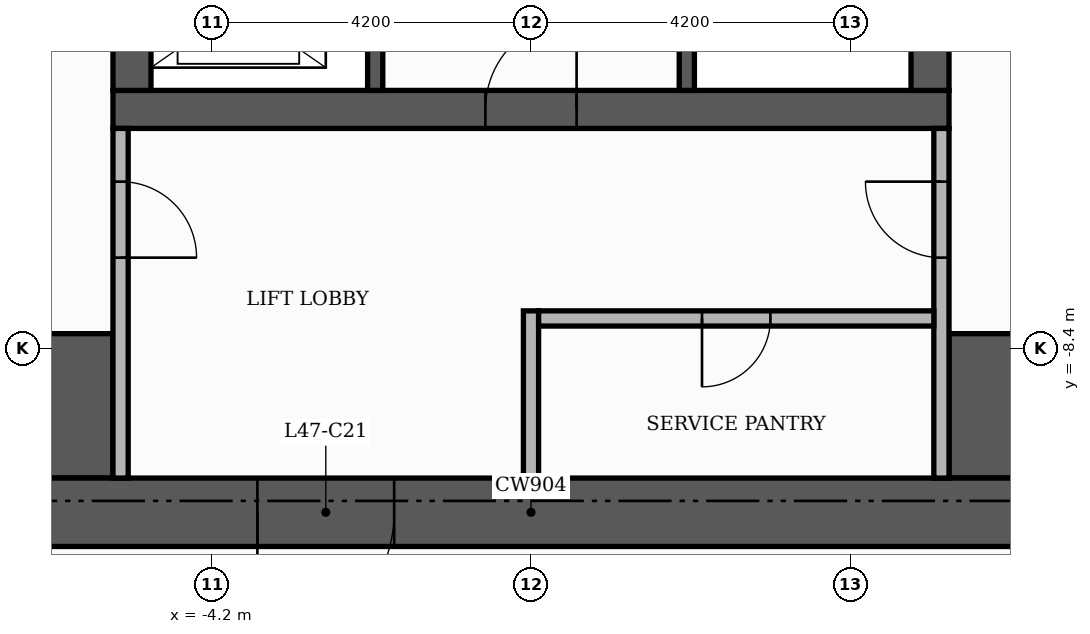
"""IFC4 building model, lengths in metres.
Left out: names, types, materials, properties, quantities, classifications, styles, units other than length and angle.
Written with IfcOpenShell. Run it as: python <this file> out.ifc"""

import sys

from ifc_helpers import new_model, si_unit, direction, frame, frame_2d, origin, place, context, subcontext, project, spatial, rectangle, extrude, element, fill, save


model = new_model("IFC4")
c1 = context("Model", 3, precision=1e-05, world=origin(), true_north=direction((0.0, 1.0)))
c2 = subcontext(c1, "Body", "Model", "MODEL_VIEW")
j1 = project(units=[si_unit("LENGTHUNIT", "METRE"), si_unit("PLANEANGLEUNIT", "RADIAN")], contexts=[c1])
p1 = place(None, origin())
s1 = spatial("IfcSite", under=j1, at=p1, CompositionType="ELEMENT")
p2 = place(p1, origin())
s2 = spatial("IfcBuilding", under=s1, at=p2, CompositionType="ELEMENT")
p3 = place(p2, frame((0.0, 0.0, 200.1)))
s3 = spatial("IfcBuildingStorey", under=s2, at=p3, CompositionType="ELEMENT", Elevation=200.1)
p4 = place(p3, frame((-5.5, -5.25, 0.0), z_axis=(0.0, 0.0, 1.0), x_axis=(1.0, 0.0, 0.0)))
e1 = element("IfcWall", 1, at=p4, inside=s3, PredefinedType="SHEAR", context=c2, shape_type="SweptSolid", body=[
    extrude(rectangle(XDim=11.0, YDim=0.5, at=frame_2d((5.5, 0.0))), origin(), (0.0, 0.0, 1.0), 3.48),
])
p5 = place(p4, frame((4.9, 0.0, 0.0)))
e2 = element("IfcOpeningElement", 2, at=p5, cuts=e1, PredefinedType="OPENING", context=c2, shape_type="SweptSolid", body=[
    extrude(rectangle(XDim=1.2, YDim=2.1, at=frame_2d((0.6, 1.05))), frame((0.0, 0.26, 0.0), z_axis=(0.0, -1.0, 0.0), x_axis=(1.0, 0.0, 0.0)), (0.0, 0.0, 1.0), 0.52),
])
for number, where, z_axis, x_axis in (
    (3, (-5.25, -5.0, 0.0), (0.0, 0.0, 1.0), (0.0, 1.0, 0.0)),
    (4, (5.25, -5.0, 0.0), (0.0, 0.0, 1.0), (0.0, 1.0, 0.0)),
):
    element("IfcWall", number, at=place(p3, frame(where, z_axis=z_axis, x_axis=x_axis)), inside=s3, PredefinedType="SHEAR", context=c2, shape_type="SweptSolid", body=[
        extrude(rectangle(XDim=10.5, YDim=0.5, at=frame_2d((5.25, 0.0))), origin(), (0.0, 0.0, 1.0), 3.48),
    ])
for number, where, z_axis, x_axis in (
    (5, (-10.1, -9.15, 0.0), (0.0, 0.0, 1.0), (1.0, 0.0, 0.0)),
    (6, (5.5, -9.15, 0.0), (0.0, 0.0, 1.0), (1.0, 0.0, 0.0)),
):
    element("IfcWall", number, at=place(p3, frame(where, z_axis=z_axis, x_axis=x_axis)), inside=s3, PredefinedType="SHEAR", context=c2, shape_type="SweptSolid", body=[
        extrude(rectangle(XDim=4.6, YDim=1.9, at=frame_2d((2.3, 0.0))), origin(), (0.0, 0.0, 1.0), 3.48),
    ])
p6 = place(p3, frame((2.05, -5.0, 0.0), z_axis=(0.0, 0.0, 1.0), x_axis=(0.0, 1.0, 0.0)))
e7 = element("IfcWall", 7, at=p6, inside=s3, PredefinedType="SHEAR", context=c2, shape_type="SweptSolid", body=[
    extrude(rectangle(XDim=6.6, YDim=0.2, at=frame_2d((3.3, 0.0))), origin(), (0.0, 0.0, 1.0), 3.48),
])
p7 = place(p6, frame((5.25, 0.0, 0.0)))
e8 = element("IfcOpeningElement", 8, at=p7, cuts=e7, PredefinedType="OPENING", context=c2, shape_type="SweptSolid", body=[
    extrude(rectangle(XDim=1.0, YDim=2.1, at=frame_2d((0.5, 1.05))), frame((0.0, 0.11, 0.0), z_axis=(0.0, -1.0, 0.0), x_axis=(1.0, 0.0, 0.0)), (0.0, 0.0, 1.0), 0.22),
])
p8 = place(p3, frame((-2.05, -5.0, 0.0), z_axis=(0.0, 0.0, 1.0), x_axis=(0.0, 1.0, 0.0)))
e9 = element("IfcWall", 9, at=p8, inside=s3, PredefinedType="SHEAR", context=c2, shape_type="SweptSolid", body=[
    extrude(rectangle(XDim=3.4, YDim=0.2, at=frame_2d((1.7, 0.0))), origin(), (0.0, 0.0, 1.0), 3.48),
])
p9 = place(p8, frame((0.55, 0.0, 0.0)))
e10 = element("IfcOpeningElement", 10, at=p9, cuts=e9, PredefinedType="OPENING", context=c2, shape_type="SweptSolid", body=[
    extrude(rectangle(XDim=1.1, YDim=2.1, at=frame_2d((0.55, 1.05))), frame((0.0, 0.11, 0.0), z_axis=(0.0, -1.0, 0.0), x_axis=(1.0, 0.0, 0.0)), (0.0, 0.0, 1.0), 0.22),
])
p10 = place(p8, frame((2.45, 0.0, 0.0)))
e11 = element("IfcOpeningElement", 11, at=p10, cuts=e9, PredefinedType="OPENING", context=c2, shape_type="SweptSolid", body=[
    extrude(rectangle(XDim=0.8, YDim=2.1, at=frame_2d((0.4, 1.05))), frame((0.0, 0.11, 0.0), z_axis=(0.0, -1.0, 0.0), x_axis=(1.0, 0.0, 0.0)), (0.0, 0.0, 1.0), 0.22),
])
p11 = place(p3, frame((-11.0, -10.55, 0.0), z_axis=(0.0, 0.0, 1.0), x_axis=(1.0, 0.0, 0.0)))
e12 = element("IfcWall", 12, at=p11, inside=s3, PredefinedType="SHEAR", context=c2, shape_type="SweptSolid", body=[
    extrude(rectangle(XDim=22.0, YDim=0.9, at=frame_2d((11.0, 0.0))), origin(), (0.0, 0.0, 1.0), 3.48),
])
p12 = place(p11, frame((7.4, 0.0, 0.0)))
e13 = element("IfcOpeningElement", 13, at=p12, cuts=e12, PredefinedType="OPENING", context=c2, shape_type="SweptSolid", body=[
    extrude(rectangle(XDim=1.8, YDim=2.2, at=frame_2d((0.9, 1.1))), frame((0.0, 0.46, 0.0), z_axis=(0.0, -1.0, 0.0), x_axis=(1.0, 0.0, 0.0)), (0.0, 0.0, 1.0), 0.92),
])
p13 = place(p3, frame((-5.4, -10.1, 0.0), z_axis=(0.0, 0.0, 1.0), x_axis=(0.0, 1.0, 0.0)))
e14 = element("IfcWall", 14, at=p13, inside=s3, PredefinedType="PARTITIONING", context=c2, shape_type="SweptSolid", body=[
    extrude(rectangle(XDim=4.6, YDim=0.2, at=frame_2d((2.3, 0.0))), origin(), (0.0, 0.0, 1.0), 3.48),
])
p14 = place(p13, frame((2.9, 0.0, 0.0)))
e15 = element("IfcOpeningElement", 15, at=p14, cuts=e14, PredefinedType="OPENING", context=c2, shape_type="SweptSolid", body=[
    extrude(rectangle(XDim=1.0, YDim=2.1, at=frame_2d((0.5, 1.05))), frame((0.0, 0.11, 0.0), z_axis=(0.0, -1.0, 0.0), x_axis=(1.0, 0.0, 0.0)), (0.0, 0.0, 1.0), 0.22),
])
p15 = place(p3, frame((0.0, -10.1, 0.0), z_axis=(0.0, 0.0, 1.0), x_axis=(0.0, 1.0, 0.0)))
e16 = element("IfcWall", 16, at=p15, inside=s3, PredefinedType="PARTITIONING", context=c2, shape_type="SweptSolid", body=[
    extrude(rectangle(XDim=2.2, YDim=0.2, at=frame_2d((1.1, 0.0))), origin(), (0.0, 0.0, 1.0), 3.48),
])
p16 = place(p3, frame((5.4, -10.1, 0.0), z_axis=(0.0, 0.0, 1.0), x_axis=(0.0, 1.0, 0.0)))
e17 = element("IfcWall", 17, at=p16, inside=s3, PredefinedType="PARTITIONING", context=c2, shape_type="SweptSolid", body=[
    extrude(rectangle(XDim=4.6, YDim=0.2, at=frame_2d((2.3, 0.0))), origin(), (0.0, 0.0, 1.0), 3.48),
])
p17 = place(p16, frame((2.9, 0.0, 0.0)))
e18 = element("IfcOpeningElement", 18, at=p17, cuts=e17, PredefinedType="OPENING", context=c2, shape_type="SweptSolid", body=[
    extrude(rectangle(XDim=1.0, YDim=2.1, at=frame_2d((0.5, 1.05))), frame((0.0, 0.11, 0.0), z_axis=(0.0, -1.0, 0.0), x_axis=(1.0, 0.0, 0.0)), (0.0, 0.0, 1.0), 0.22),
])
p18 = place(p3, frame((0.1, -8.0, 0.0), z_axis=(0.0, 0.0, 1.0), x_axis=(1.0, 0.0, 0.0)))
e19 = element("IfcWall", 19, at=p18, inside=s3, PredefinedType="PARTITIONING", context=c2, shape_type="SweptSolid", body=[
    extrude(rectangle(XDim=5.2, YDim=0.2, at=frame_2d((2.6, 0.0))), origin(), (0.0, 0.0, 1.0), 3.48),
])
p19 = place(p18, frame((2.15, 0.0, 0.0)))
e20 = element("IfcOpeningElement", 20, at=p19, cuts=e19, PredefinedType="OPENING", context=c2, shape_type="SweptSolid", body=[
    extrude(rectangle(XDim=0.9, YDim=2.1, at=frame_2d((0.45, 1.05))), frame((0.0, 0.11, 0.0), z_axis=(0.0, -1.0, 0.0), x_axis=(1.0, 0.0, 0.0)), (0.0, 0.0, 1.0), 0.22),
])
p20 = place(p5, origin())
e21 = element("IfcDoor", 21, at=p20, inside=s3, OperationType="SINGLE_SWING_RIGHT", PredefinedType="DOOR", context=c2, shape_type="SweptSolid", body=[
    extrude(rectangle(XDim=1.2, YDim=2.1, at=frame_2d((0.6, 1.05))), frame((0.0, 0.025, 0.0), z_axis=(0.0, -1.0, 0.0), x_axis=(1.0, 0.0, 0.0)), (0.0, 0.0, 1.0), 0.05),
])
fill(e2, e21)
p21 = place(p14, frame((1.0, 0.0, 0.0), z_axis=(0.0, 0.0, 1.0), x_axis=(-1.0, 0.0, 0.0)))
e22 = element("IfcDoor", 22, at=p21, inside=s3, OperationType="SINGLE_SWING_LEFT", PredefinedType="DOOR", context=c2, shape_type="SweptSolid", body=[
    extrude(rectangle(XDim=1.0, YDim=2.1, at=frame_2d((0.5, 1.05))), frame((0.0, 0.025, 0.0), z_axis=(0.0, -1.0, 0.0), x_axis=(1.0, 0.0, 0.0)), (0.0, 0.0, 1.0), 0.05),
])
fill(e15, e22)
p22 = place(p17, origin())
e23 = element("IfcDoor", 23, at=p22, inside=s3, OperationType="SINGLE_SWING_RIGHT", PredefinedType="DOOR", context=c2, shape_type="SweptSolid", body=[
    extrude(rectangle(XDim=1.0, YDim=2.1, at=frame_2d((0.5, 1.05))), frame((0.0, 0.025, 0.0), z_axis=(0.0, -1.0, 0.0), x_axis=(1.0, 0.0, 0.0)), (0.0, 0.0, 1.0), 0.05),
])
fill(e18, e23)
p23 = place(p12, frame((1.8, 0.0, 0.0), z_axis=(0.0, 0.0, 1.0), x_axis=(-1.0, 0.0, 0.0)))
e24 = element("IfcDoor", 24, at=p23, inside=s3, OperationType="DOUBLE_DOOR_SINGLE_SWING", PredefinedType="DOOR", context=c2, shape_type="SweptSolid", body=[
    extrude(rectangle(XDim=1.8, YDim=2.2, at=frame_2d((0.9, 1.1))), frame((0.0, 0.025, 0.0), z_axis=(0.0, -1.0, 0.0), x_axis=(1.0, 0.0, 0.0)), (0.0, 0.0, 1.0), 0.05),
])
fill(e13, e24)
p24 = place(p19, frame((0.9, 0.0, 0.0), z_axis=(0.0, 0.0, 1.0), x_axis=(-1.0, 0.0, 0.0)))
e25 = element("IfcDoor", 25, at=p24, inside=s3, OperationType="SINGLE_SWING_LEFT", PredefinedType="DOOR", context=c2, shape_type="SweptSolid", body=[
    extrude(rectangle(XDim=0.9, YDim=2.1, at=frame_2d((0.45, 1.05))), frame((0.0, 0.025, 0.0), z_axis=(0.0, -1.0, 0.0), x_axis=(1.0, 0.0, 0.0)), (0.0, 0.0, 1.0), 0.05),
])
fill(e20, e25)
save(model, sys.argv[1])
